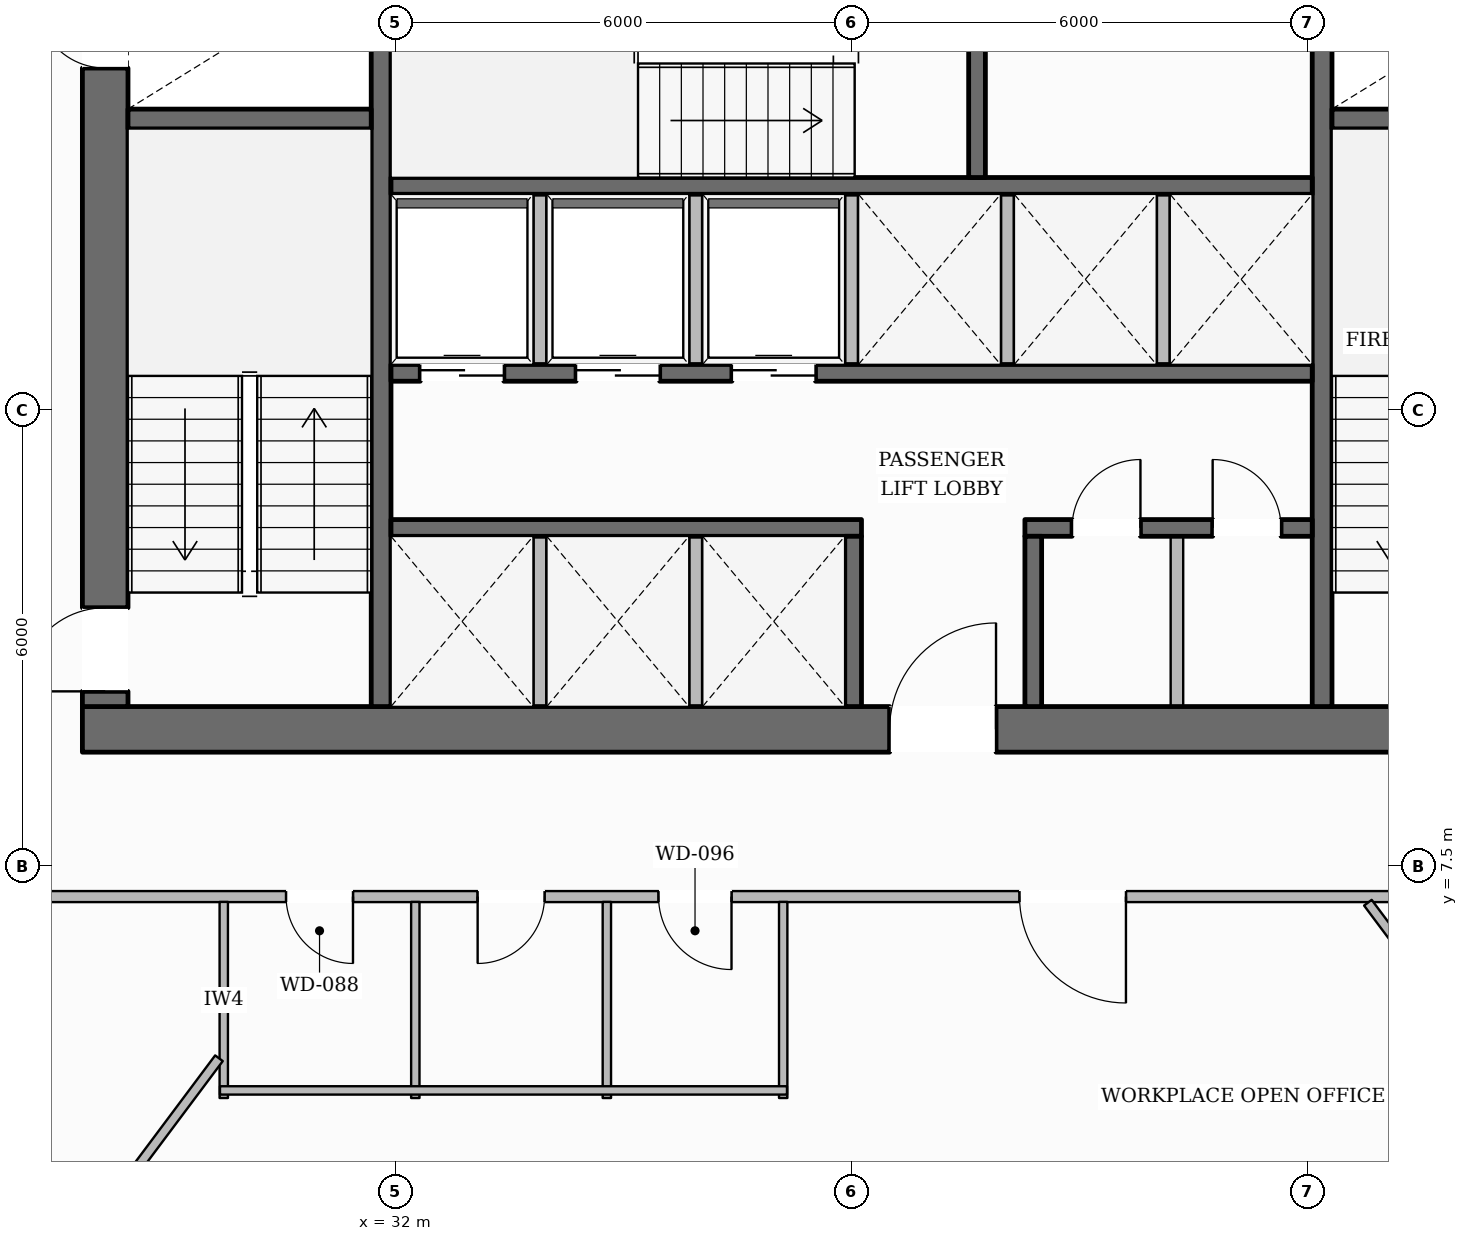
"""IFC4 building model, lengths in metres.
Left out: names, types, materials, properties, quantities, classifications, styles, units other than length and angle.
Written with IfcOpenShell. Run it as: python <this file> out.ifc"""

import sys

from ifc_helpers import new_model, si_unit, direction, frame, frame_2d, origin, place, context, subcontext, project, spatial, rectangle, extrude, element, fill, save


model = new_model("IFC4")
c1 = context("Model", 3, precision=1e-05, world=origin(), true_north=direction((0.0, 1.0)))
c2 = subcontext(c1, "Body", "Model", "MODEL_VIEW")
j1 = project(units=[si_unit("LENGTHUNIT", "METRE"), si_unit("PLANEANGLEUNIT", "RADIAN")], contexts=[c1])
p1 = place(None, origin())
s1 = spatial("IfcSite", under=j1, at=p1, CompositionType="ELEMENT")
p2 = place(p1, origin())
s2 = spatial("IfcBuilding", under=s1, at=p2, CompositionType="ELEMENT")
p3 = place(p2, frame((0.0, 0.0, 29.1)))
s3 = spatial("IfcBuildingStorey", under=s2, at=p3, CompositionType="ELEMENT", Elevation=29.1)
p4 = place(p3, frame((27.88, 9.3, 0.0), z_axis=(0.0, 0.0, 1.0), x_axis=(1.0, 0.0, 0.0)))
e1 = element("IfcWall", 1, at=p4, inside=s3, PredefinedType="SOLIDWALL", context=c2, shape_type="SweptSolid", body=[
    extrude(rectangle(XDim=20.24, YDim=0.6, at=frame_2d((10.12, 0.0))), origin(), (0.0, 0.0, 1.0), 3.59),
])
p5 = place(p4, frame((10.62, 0.0, 0.0)))
e2 = element("IfcOpeningElement", 2, at=p5, cuts=e1, PredefinedType="OPENING", context=c2, shape_type="SweptSolid", body=[
    extrude(rectangle(XDim=1.4, YDim=2.2, at=frame_2d((0.7, 1.1))), frame((0.0, 0.31, 0.0), z_axis=(0.0, -1.0, 0.0), x_axis=(1.0, 0.0, 0.0)), (0.0, 0.0, 1.0), 0.62),
])
p6 = place(p3, frame((28.18, 9.6, 0.0), z_axis=(0.0, 0.0, 1.0), x_axis=(0.0, 1.0, 0.0)))
e3 = element("IfcWall", 3, at=p6, inside=s3, PredefinedType="SOLIDWALL", context=c2, shape_type="SweptSolid", body=[
    extrude(rectangle(XDim=13.0, YDim=0.6, at=frame_2d((6.5, 0.0))), origin(), (0.0, 0.0, 1.0), 3.59),
])
p7 = place(p6, frame((0.2, 0.0, 0.0)))
e4 = element("IfcOpeningElement", 4, at=p7, cuts=e3, PredefinedType="OPENING", context=c2, shape_type="SweptSolid", body=[
    extrude(rectangle(XDim=1.1, YDim=2.15, at=frame_2d((0.55, 1.075))), frame((0.0, 0.31, 0.0), z_axis=(0.0, -1.0, 0.0), x_axis=(1.0, 0.0, 0.0)), (0.0, 0.0, 1.0), 0.62),
])
p8 = place(p6, frame((8.4, 0.0, 0.0)))
e5 = element("IfcOpeningElement", 5, at=p8, cuts=e3, PredefinedType="OPENING", context=c2, shape_type="SweptSolid", body=[
    extrude(rectangle(XDim=0.9, YDim=2.1, at=frame_2d((0.45, 1.05))), frame((0.0, 0.31, 0.0), z_axis=(0.0, -1.0, 0.0), x_axis=(1.0, 0.0, 0.0)), (0.0, 0.0, 1.0), 0.62),
])
p9 = place(p3, frame((31.81, 9.6, 0.0), z_axis=(0.0, 0.0, 1.0), x_axis=(0.0, 1.0, 0.0)))
e6 = element("IfcWall", 6, at=p9, inside=s3, PredefinedType="SHEAR", context=c2, shape_type="SweptSolid", body=[
    extrude(rectangle(XDim=13.0, YDim=0.26, at=frame_2d((6.5, 0.0))), origin(), (0.0, 0.0, 1.0), 3.59),
])
p10 = place(p9, frame((10.925, 0.0, 0.0)))
e7 = element("IfcOpeningElement", 7, at=p10, cuts=e6, PredefinedType="OPENING", context=c2, shape_type="SweptSolid", body=[
    extrude(rectangle(XDim=1.25, YDim=2.25, at=frame_2d((0.625, 1.125))), frame((0.0, 0.14, 0.0), z_axis=(0.0, -1.0, 0.0), x_axis=(1.0, 0.0, 0.0)), (0.0, 0.0, 1.0), 0.28),
])
p11 = place(p3, frame((44.19, 9.6, 0.0), z_axis=(0.0, 0.0, 1.0), x_axis=(0.0, 1.0, 0.0)))
e8 = element("IfcWall", 8, at=p11, inside=s3, PredefinedType="SHEAR", context=c2, shape_type="SweptSolid", body=[
    extrude(rectangle(XDim=13.0, YDim=0.26, at=frame_2d((6.5, 0.0))), origin(), (0.0, 0.0, 1.0), 3.59),
])
p12 = place(p11, frame((10.925, 0.0, 0.0)))
e9 = element("IfcOpeningElement", 9, at=p12, cuts=e8, PredefinedType="OPENING", context=c2, shape_type="SweptSolid", body=[
    extrude(rectangle(XDim=1.25, YDim=2.25, at=frame_2d((0.625, 1.125))), frame((0.0, 0.14, 0.0), z_axis=(0.0, -1.0, 0.0), x_axis=(1.0, 0.0, 0.0)), (0.0, 0.0, 1.0), 0.28),
])
for number, where, z_axis, x_axis in (
    (10, (28.48, 17.33, 0.0), (0.0, 0.0, 1.0), (1.0, 0.0, 0.0)),
    (11, (44.32, 17.33, 0.0), (0.0, 0.0, 1.0), (1.0, 0.0, 0.0)),
):
    element("IfcWall", number, at=place(p3, frame(where, z_axis=z_axis, x_axis=x_axis)), inside=s3, PredefinedType="SHEAR", context=c2, shape_type="SweptSolid", body=[
        extrude(rectangle(XDim=3.2, YDim=0.26, at=frame_2d((1.6, 0.0))), origin(), (0.0, 0.0, 1.0), 3.59),
    ])
p13 = place(p3, frame((31.94, 16.45, 0.0), z_axis=(0.0, 0.0, 1.0), x_axis=(1.0, 0.0, 0.0)))
e12 = element("IfcWall", 12, at=p13, inside=s3, PredefinedType="SOLIDWALL", context=c2, shape_type="SweptSolid", body=[
    extrude(rectangle(XDim=12.12, YDim=0.22, at=frame_2d((6.06, 0.0))), origin(), (0.0, 0.0, 1.0), 3.59),
])
p14 = place(p3, frame((39.65, 16.56, 0.0), z_axis=(0.0, 0.0, 1.0), x_axis=(0.0, 1.0, 0.0)))
e13 = element("IfcWall", 13, at=p14, inside=s3, PredefinedType="SOLIDWALL", context=c2, shape_type="SweptSolid", body=[
    extrude(rectangle(XDim=3.2, YDim=0.22, at=frame_2d((1.6, 0.0))), origin(), (0.0, 0.0, 1.0), 3.59),
])
p15 = place(p3, frame((31.94, 13.99, 0.0), z_axis=(0.0, 0.0, 1.0), x_axis=(1.0, 0.0, 0.0)))
e14 = element("IfcWall", 14, at=p15, inside=s3, PredefinedType="SOLIDWALL", context=c2, shape_type="SweptSolid", body=[
    extrude(rectangle(XDim=12.12, YDim=0.22, at=frame_2d((6.06, 0.0))), origin(), (0.0, 0.0, 1.0), 3.59),
])
p16 = place(p15, frame((0.385, 0.0, 0.0)))
e15 = element("IfcOpeningElement", 15, at=p16, cuts=e14, PredefinedType="OPENING", context=c2, shape_type="SweptSolid", body=[
    extrude(rectangle(XDim=1.1, YDim=2.2, at=frame_2d((0.55, 1.1))), frame((0.0, 0.12, 0.0), z_axis=(0.0, -1.0, 0.0), x_axis=(1.0, 0.0, 0.0)), (0.0, 0.0, 1.0), 0.24),
])
p17 = place(p15, frame((2.435, 0.0, 0.0)))
e16 = element("IfcOpeningElement", 16, at=p17, cuts=e14, PredefinedType="OPENING", context=c2, shape_type="SweptSolid", body=[
    extrude(rectangle(XDim=1.1, YDim=2.2, at=frame_2d((0.55, 1.1))), frame((0.0, 0.12, 0.0), z_axis=(0.0, -1.0, 0.0), x_axis=(1.0, 0.0, 0.0)), (0.0, 0.0, 1.0), 0.24),
])
p18 = place(p15, frame((4.485, 0.0, 0.0)))
e17 = element("IfcOpeningElement", 17, at=p18, cuts=e14, PredefinedType="OPENING", context=c2, shape_type="SweptSolid", body=[
    extrude(rectangle(XDim=1.1, YDim=2.2, at=frame_2d((0.55, 1.1))), frame((0.0, 0.12, 0.0), z_axis=(0.0, -1.0, 0.0), x_axis=(1.0, 0.0, 0.0)), (0.0, 0.0, 1.0), 0.24),
])
p19 = place(p3, frame((31.94, 11.95, 0.0), z_axis=(0.0, 0.0, 1.0), x_axis=(1.0, 0.0, 0.0)))
e18 = element("IfcWall", 18, at=p19, inside=s3, PredefinedType="SOLIDWALL", context=c2, shape_type="SweptSolid", body=[
    extrude(rectangle(XDim=6.19, YDim=0.22, at=frame_2d((3.095, 0.0))), origin(), (0.0, 0.0, 1.0), 3.59),
])
p20 = place(p3, frame((40.28, 11.95, 0.0), z_axis=(0.0, 0.0, 1.0), x_axis=(1.0, 0.0, 0.0)))
e19 = element("IfcWall", 19, at=p20, inside=s3, PredefinedType="SOLIDWALL", context=c2, shape_type="SweptSolid", body=[
    extrude(rectangle(XDim=3.78, YDim=0.22, at=frame_2d((1.89, 0.0))), origin(), (0.0, 0.0, 1.0), 3.59),
])
p21 = place(p20, frame((0.62, 0.0, 0.0)))
e20 = element("IfcOpeningElement", 20, at=p21, cuts=e19, PredefinedType="OPENING", context=c2, shape_type="SweptSolid", body=[
    extrude(rectangle(XDim=0.9, YDim=2.1, at=frame_2d((0.45, 1.05))), frame((0.0, 0.12, 0.0), z_axis=(0.0, -1.0, 0.0), x_axis=(1.0, 0.0, 0.0)), (0.0, 0.0, 1.0), 0.24),
])
p22 = place(p20, frame((2.47, 0.0, 0.0)))
e21 = element("IfcOpeningElement", 21, at=p22, cuts=e19, PredefinedType="OPENING", context=c2, shape_type="SweptSolid", body=[
    extrude(rectangle(XDim=0.9, YDim=2.1, at=frame_2d((0.45, 1.05))), frame((0.0, 0.12, 0.0), z_axis=(0.0, -1.0, 0.0), x_axis=(1.0, 0.0, 0.0)), (0.0, 0.0, 1.0), 0.24),
])
for number, where, z_axis, x_axis in (
    (22, (38.02, 9.6, 0.0), (0.0, 0.0, 1.0), (0.0, 1.0, 0.0)),
    (23, (40.39, 9.6, 0.0), (0.0, 0.0, 1.0), (0.0, 1.0, 0.0)),
):
    element("IfcWall", number, at=place(p3, frame(where, z_axis=z_axis, x_axis=x_axis)), inside=s3, PredefinedType="SOLIDWALL", context=c2, shape_type="SweptSolid", body=[
        extrude(rectangle(XDim=2.24, YDim=0.22, at=frame_2d((1.12, 0.0))), origin(), (0.0, 0.0, 1.0), 3.59),
    ])
p23 = place(p3, frame((13.263, 14.928, 0.0), z_axis=(0.0, 0.0, 1.0), x_axis=(0.495711630902, 0.868487178367, 0.0)))
e24 = element("IfcWall", 24, at=p23, inside=s3, PredefinedType="STANDARD", context=c2, shape_type="SweptSolid", body=[
    extrude(rectangle(XDim=34.092, YDim=0.38, at=frame_2d((17.046, 0.0))), origin(), (0.0, 0.0, 1.0), 2.97),
])
p24 = place(p23, frame((30.027, 0.0, 0.65)))
e25 = element("IfcOpeningElement", 25, at=p24, cuts=e24, PredefinedType="OPENING", context=c2, shape_type="SweptSolid", body=[
    extrude(rectangle(XDim=1.65, YDim=1.75, at=frame_2d((0.825, 0.875))), frame((0.0, 0.2, 0.0), z_axis=(0.0, -1.0, 0.0), x_axis=(1.0, 0.0, 0.0)), (0.0, 0.0, 1.0), 0.4),
])
p25 = place(p23, frame((24.504, 0.0, 0.65)))
e26 = element("IfcOpeningElement", 26, at=p25, cuts=e24, PredefinedType="OPENING", context=c2, shape_type="SweptSolid", body=[
    extrude(rectangle(XDim=1.65, YDim=1.75, at=frame_2d((0.825, 0.875))), frame((0.0, 0.2, 0.0), z_axis=(0.0, -1.0, 0.0), x_axis=(1.0, 0.0, 0.0)), (0.0, 0.0, 1.0), 0.4),
])
p26 = place(p23, frame((13.457, 0.0, 0.65)))
e27 = element("IfcOpeningElement", 27, at=p26, cuts=e24, PredefinedType="OPENING", context=c2, shape_type="SweptSolid", body=[
    extrude(rectangle(XDim=1.65, YDim=1.75, at=frame_2d((0.825, 0.875))), frame((0.0, 0.2, 0.0), z_axis=(0.0, -1.0, 0.0), x_axis=(1.0, 0.0, 0.0)), (0.0, 0.0, 1.0), 0.4),
])
p27 = place(p23, frame((7.934, 0.0, 0.65)))
e28 = element("IfcOpeningElement", 28, at=p27, cuts=e24, PredefinedType="OPENING", context=c2, shape_type="SweptSolid", body=[
    extrude(rectangle(XDim=1.65, YDim=1.75, at=frame_2d((0.825, 0.875))), frame((0.0, 0.2, 0.0), z_axis=(0.0, -1.0, 0.0), x_axis=(1.0, 0.0, 0.0)), (0.0, 0.0, 1.0), 0.4),
])
p28 = place(p23, frame((2.411, 0.0, 0.65)))
e29 = element("IfcOpeningElement", 29, at=p28, cuts=e24, PredefinedType="OPENING", context=c2, shape_type="SweptSolid", body=[
    extrude(rectangle(XDim=1.65, YDim=1.75, at=frame_2d((0.825, 0.875))), frame((0.0, 0.2, 0.0), z_axis=(0.0, -1.0, 0.0), x_axis=(1.0, 0.0, 0.0)), (0.0, 0.0, 1.0), 0.4),
])
for number, where, z_axis, x_axis in (
    (30, (33.9, 9.6, 0.0), (0.0, 0.0, 1.0), (0.0, 1.0, 0.0)),
    (31, (35.95, 9.6, 0.0), (0.0, 0.0, 1.0), (0.0, 1.0, 0.0)),
    (32, (33.9, 14.1, 0.0), (0.0, 0.0, 1.0), (0.0, 1.0, 0.0)),
    (33, (35.95, 14.1, 0.0), (0.0, 0.0, 1.0), (0.0, 1.0, 0.0)),
    (34, (38.0, 14.1, 0.0), (0.0, 0.0, 1.0), (0.0, 1.0, 0.0)),
    (35, (40.05, 14.1, 0.0), (0.0, 0.0, 1.0), (0.0, 1.0, 0.0)),
    (36, (42.1, 14.1, 0.0), (0.0, 0.0, 1.0), (0.0, 1.0, 0.0)),
    (37, (42.28, 9.6, 0.0), (0.0, 0.0, 1.0), (0.0, 1.0, 0.0)),
):
    element("IfcWall", number, at=place(p3, frame(where, z_axis=z_axis, x_axis=x_axis)), inside=s3, PredefinedType="PARTITIONING", context=c2, shape_type="SweptSolid", body=[
        extrude(rectangle(XDim=2.24, YDim=0.165, at=frame_2d((1.12, 0.0))), origin(), (0.0, 0.0, 1.0), 3.59),
    ])
p29 = place(p3, frame((49.92, 7.1, 0.0), z_axis=(0.0, 0.0, 1.0), x_axis=(-1.0, 0.0, 0.0)))
e38 = element("IfcWall", 38, at=p29, inside=s3, PredefinedType="PARTITIONING", context=c2, shape_type="SweptSolid", body=[
    extrude(rectangle(XDim=23.84, YDim=0.145, at=frame_2d((11.92, 0.0))), origin(), (0.0, 0.0, 1.0), 3.278),
])
p30 = place(p29, frame((18.48, 0.0, 0.0)))
e39 = element("IfcOpeningElement", 39, at=p30, cuts=e38, PredefinedType="OPENING", context=c2, shape_type="SweptSolid", body=[
    extrude(rectangle(XDim=0.88, YDim=2.1, at=frame_2d((0.44, 1.05))), frame((0.0, 0.083, 0.0), z_axis=(0.0, -1.0, 0.0), x_axis=(1.0, 0.0, 0.0)), (0.0, 0.0, 1.0), 0.165),
])
p31 = place(p29, frame((15.96, 0.0, 0.0)))
e40 = element("IfcOpeningElement", 40, at=p31, cuts=e38, PredefinedType="OPENING", context=c2, shape_type="SweptSolid", body=[
    extrude(rectangle(XDim=0.88, YDim=2.1, at=frame_2d((0.44, 1.05))), frame((0.0, 0.083, 0.0), z_axis=(0.0, -1.0, 0.0), x_axis=(1.0, 0.0, 0.0)), (0.0, 0.0, 1.0), 0.165),
])
p32 = place(p29, frame((13.5, 0.0, 0.0)))
e41 = element("IfcOpeningElement", 41, at=p32, cuts=e38, PredefinedType="OPENING", context=c2, shape_type="SweptSolid", body=[
    extrude(rectangle(XDim=0.96, YDim=2.1, at=frame_2d((0.48, 1.05))), frame((0.0, 0.083, 0.0), z_axis=(0.0, -1.0, 0.0), x_axis=(1.0, 0.0, 0.0)), (0.0, 0.0, 1.0), 0.165),
])
p33 = place(p29, frame((8.311, 0.0, 0.0)))
e42 = element("IfcOpeningElement", 42, at=p33, cuts=e38, PredefinedType="OPENING", context=c2, shape_type="SweptSolid", body=[
    extrude(rectangle(XDim=1.4, YDim=2.2, at=frame_2d((0.7, 1.1))), frame((0.0, 0.083, 0.0), z_axis=(0.0, -1.0, 0.0), x_axis=(1.0, 0.0, 0.0)), (0.0, 0.0, 1.0), 0.165),
])
for number, where, z_axis, x_axis in (
    (43, (29.74, 4.45, 0.0), (0.0, 0.0, 1.0), (0.0, 1.0, 0.0)),
    (44, (32.26, 4.45, 0.0), (0.0, 0.0, 1.0), (0.0, 1.0, 0.0)),
    (45, (34.78, 4.45, 0.0), (0.0, 0.0, 1.0), (0.0, 1.0, 0.0)),
    (46, (37.1, 4.45, 0.0), (0.0, 0.0, 1.0), (0.0, 1.0, 0.0)),
):
    element("IfcWall", number, at=place(p3, frame(where, z_axis=z_axis, x_axis=x_axis)), inside=s3, PredefinedType="PLUMBINGWALL", context=c2, shape_type="SweptSolid", body=[
        extrude(rectangle(XDim=2.58, YDim=0.11, at=frame_2d((1.29, 0.0))), origin(), (0.0, 0.0, 1.0), 3.59),
    ])
p34 = place(p3, frame((29.69, 4.55, 0.0), z_axis=(0.0, 0.0, 1.0), x_axis=(1.0, 0.0, 0.0)))
e47 = element("IfcWall", 47, at=p34, inside=s3, PredefinedType="PLUMBINGWALL", context=c2, shape_type="SweptSolid", body=[
    extrude(rectangle(XDim=7.46, YDim=0.11, at=frame_2d((3.73, 0.0))), origin(), (0.0, 0.0, 1.0), 3.59),
])
p35 = place(p3, frame((29.677, 4.973, 0.0), z_axis=(0.0, 0.0, 1.0), x_axis=(-0.598981151393, -0.800763123699, 0.0)))
e48 = element("IfcWall", 48, at=p35, inside=s3, PredefinedType="PARTITIONING", context=c2, shape_type="SweptSolid", body=[
    extrude(rectangle(XDim=3.874, YDim=0.125, at=frame_2d((1.937, 0.0))), origin(), (0.0, 0.0, 1.0), 3.59),
])
p36 = place(p3, frame((44.792, 7.02, 0.0), z_axis=(0.0, 0.0, 1.0), x_axis=(0.598984945208, -0.800760285863, 0.0)))
e49 = element("IfcWall", 49, at=p36, inside=s3, PredefinedType="PARTITIONING", context=c2, shape_type="SweptSolid", body=[
    extrude(rectangle(XDim=6.43, YDim=0.125, at=frame_2d((3.215, 0.0))), origin(), (0.0, 0.0, 1.0), 3.59),
])
p37 = place(p7, origin())
e50 = element("IfcDoor", 50, at=p37, inside=s3, OperationType="SINGLE_SWING_LEFT", PredefinedType="DOOR", context=c2, shape_type="SweptSolid", body=[
    extrude(rectangle(XDim=1.1, YDim=2.15, at=frame_2d((0.55, 1.075))), frame((0.0, 0.025, 0.0), z_axis=(0.0, -1.0, 0.0), x_axis=(1.0, 0.0, 0.0)), (0.0, 0.0, 1.0), 0.05),
])
fill(e4, e50)
p38 = place(p8, origin())
e51 = element("IfcDoor", 51, at=p38, inside=s3, OperationType="SINGLE_SWING_RIGHT", PredefinedType="DOOR", context=c2, shape_type="SweptSolid", body=[
    extrude(rectangle(XDim=0.9, YDim=2.1, at=frame_2d((0.45, 1.05))), frame((0.0, 0.025, 0.0), z_axis=(0.0, -1.0, 0.0), x_axis=(1.0, 0.0, 0.0)), (0.0, 0.0, 1.0), 0.05),
])
fill(e5, e51)
p39 = place(p5, origin())
e52 = element("IfcDoor", 52, at=p39, inside=s3, OperationType="SINGLE_SWING_RIGHT", PredefinedType="DOOR", context=c2, shape_type="SweptSolid", body=[
    extrude(rectangle(XDim=1.4, YDim=2.2, at=frame_2d((0.7, 1.1))), frame((0.0, 0.025, 0.0), z_axis=(0.0, -1.0, 0.0), x_axis=(1.0, 0.0, 0.0)), (0.0, 0.0, 1.0), 0.05),
])
fill(e2, e52)
p40 = place(p16, origin())
e53 = element("IfcDoor", 53, at=p40, inside=s3, OperationType="DOUBLE_DOOR_SLIDING", PredefinedType="DOOR", context=c2, shape_type="SweptSolid", body=[
    extrude(rectangle(XDim=1.1, YDim=2.2, at=frame_2d((0.55, 1.1))), frame((0.0, 0.025, 0.0), z_axis=(0.0, -1.0, 0.0), x_axis=(1.0, 0.0, 0.0)), (0.0, 0.0, 1.0), 0.05),
])
fill(e15, e53)
p41 = place(p17, origin())
e54 = element("IfcDoor", 54, at=p41, inside=s3, OperationType="DOUBLE_DOOR_SLIDING", PredefinedType="DOOR", context=c2, shape_type="SweptSolid", body=[
    extrude(rectangle(XDim=1.1, YDim=2.2, at=frame_2d((0.55, 1.1))), frame((0.0, 0.025, 0.0), z_axis=(0.0, -1.0, 0.0), x_axis=(1.0, 0.0, 0.0)), (0.0, 0.0, 1.0), 0.05),
])
fill(e16, e54)
p42 = place(p18, origin())
e55 = element("IfcDoor", 55, at=p42, inside=s3, OperationType="DOUBLE_DOOR_SLIDING", PredefinedType="DOOR", context=c2, shape_type="SweptSolid", body=[
    extrude(rectangle(XDim=1.1, YDim=2.2, at=frame_2d((0.55, 1.1))), frame((0.0, 0.025, 0.0), z_axis=(0.0, -1.0, 0.0), x_axis=(1.0, 0.0, 0.0)), (0.0, 0.0, 1.0), 0.05),
])
fill(e17, e55)
p43 = place(p21, origin())
e56 = element("IfcDoor", 56, at=p43, inside=s3, OperationType="SINGLE_SWING_RIGHT", PredefinedType="DOOR", context=c2, shape_type="SweptSolid", body=[
    extrude(rectangle(XDim=0.9, YDim=2.1, at=frame_2d((0.45, 1.05))), frame((0.0, 0.025, 0.0), z_axis=(0.0, -1.0, 0.0), x_axis=(1.0, 0.0, 0.0)), (0.0, 0.0, 1.0), 0.05),
])
fill(e20, e56)
p44 = place(p22, origin())
e57 = element("IfcDoor", 57, at=p44, inside=s3, OperationType="SINGLE_SWING_LEFT", PredefinedType="DOOR", context=c2, shape_type="SweptSolid", body=[
    extrude(rectangle(XDim=0.9, YDim=2.1, at=frame_2d((0.45, 1.05))), frame((0.0, 0.025, 0.0), z_axis=(0.0, -1.0, 0.0), x_axis=(1.0, 0.0, 0.0)), (0.0, 0.0, 1.0), 0.05),
])
fill(e21, e57)
p45 = place(p30, origin())
e58 = element("IfcDoor", 58, at=p45, inside=s3, OperationType="SINGLE_SWING_LEFT", PredefinedType="DOOR", context=c2, shape_type="SweptSolid", body=[
    extrude(rectangle(XDim=0.88, YDim=2.1, at=frame_2d((0.44, 1.05))), frame((0.0, 0.025, 0.0), z_axis=(0.0, -1.0, 0.0), x_axis=(1.0, 0.0, 0.0)), (0.0, 0.0, 1.0), 0.05),
])
fill(e39, e58)
p46 = place(p31, origin())
e59 = element("IfcDoor", 59, at=p46, inside=s3, OperationType="SINGLE_SWING_RIGHT", PredefinedType="DOOR", context=c2, shape_type="SweptSolid", body=[
    extrude(rectangle(XDim=0.88, YDim=2.1, at=frame_2d((0.44, 1.05))), frame((0.0, 0.025, 0.0), z_axis=(0.0, -1.0, 0.0), x_axis=(1.0, 0.0, 0.0)), (0.0, 0.0, 1.0), 0.05),
])
fill(e40, e59)
p47 = place(p32, origin())
e60 = element("IfcDoor", 60, at=p47, inside=s3, OperationType="SINGLE_SWING_LEFT", PredefinedType="DOOR", context=c2, shape_type="SweptSolid", body=[
    extrude(rectangle(XDim=0.96, YDim=2.1, at=frame_2d((0.48, 1.05))), frame((0.0, 0.025, 0.0), z_axis=(0.0, -1.0, 0.0), x_axis=(1.0, 0.0, 0.0)), (0.0, 0.0, 1.0), 0.05),
])
fill(e41, e60)
p48 = place(p33, origin())
e61 = element("IfcDoor", 61, at=p48, inside=s3, OperationType="SINGLE_SWING_LEFT", PredefinedType="DOOR", context=c2, shape_type="SweptSolid", body=[
    extrude(rectangle(XDim=1.4, YDim=2.2, at=frame_2d((0.7, 1.1))), frame((0.0, 0.025, 0.0), z_axis=(0.0, -1.0, 0.0), x_axis=(1.0, 0.0, 0.0)), (0.0, 0.0, 1.0), 0.05),
])
fill(e42, e61)
save(model, sys.argv[1])
